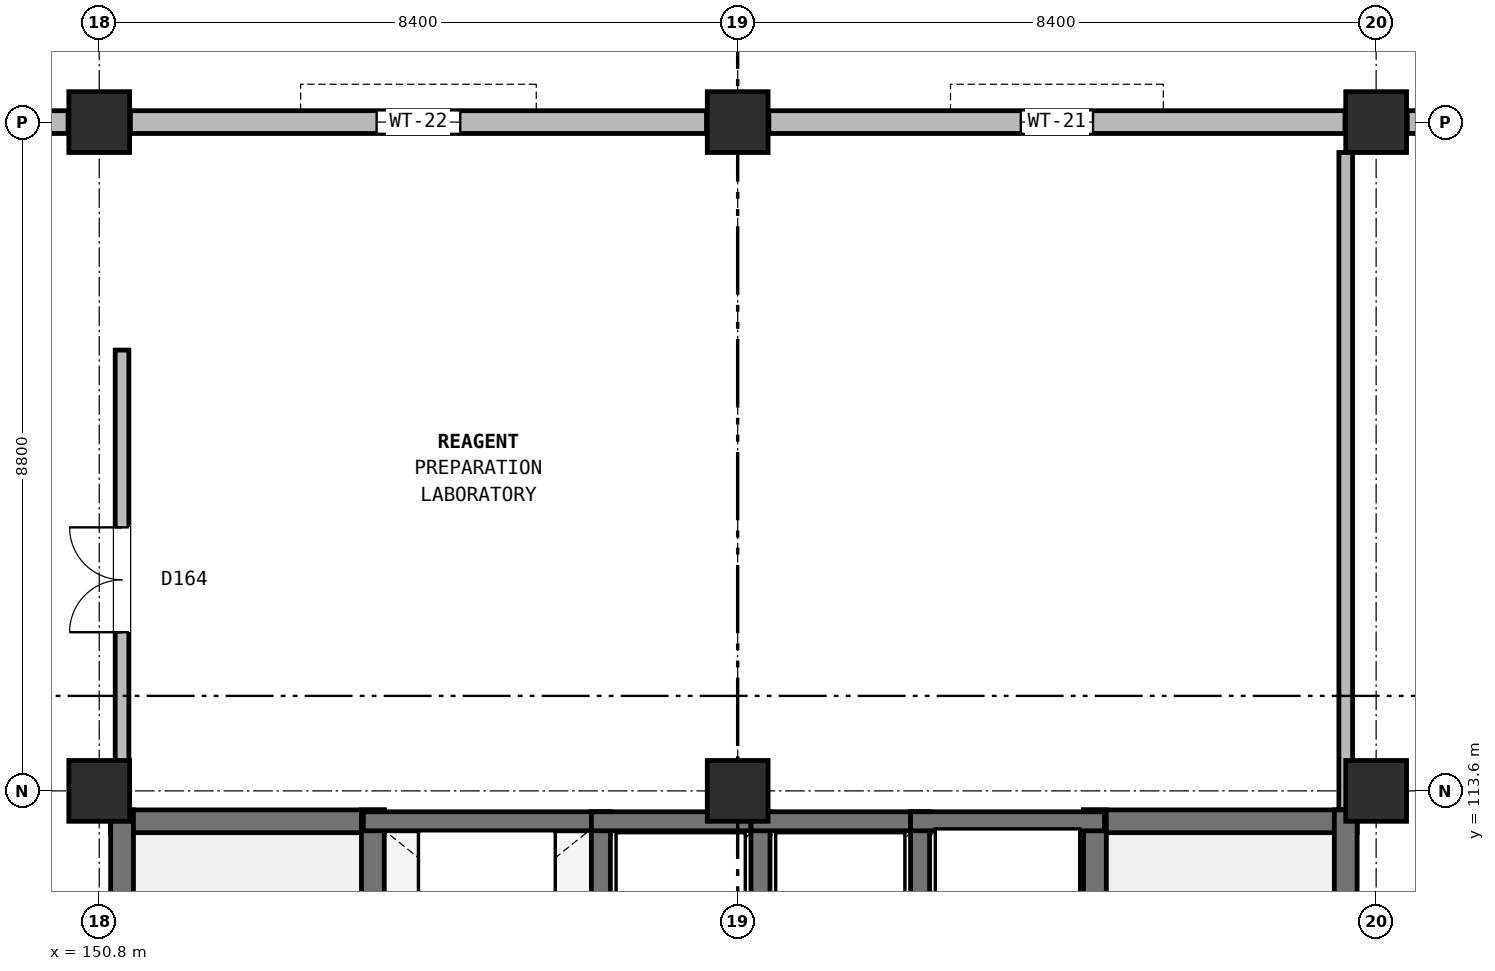
"""IFC4 building model, lengths in metres.
Left out: names, types, materials, properties, quantities, classifications, styles, units other than length and angle.
Written with IfcOpenShell. Run it as: python <this file> out.ifc"""

import sys

from ifc_helpers import new_model, si_unit, direction, frame, frame_2d, origin, origin_2d, place, context, subcontext, project, spatial, rectangle, extrude, element, fill, save


model = new_model("IFC4")
c1 = context("Model", 3, precision=1e-05, world=origin(), true_north=direction((0.0, 1.0)))
c2 = subcontext(c1, "Body", "Model", "MODEL_VIEW")
j1 = project(units=[si_unit("LENGTHUNIT", "METRE"), si_unit("PLANEANGLEUNIT", "RADIAN")], contexts=[c1])
p1 = place(None, origin())
s1 = spatial("IfcSite", under=j1, at=p1, CompositionType="ELEMENT")
p2 = place(p1, origin())
s2 = spatial("IfcBuilding", under=s1, at=p2, CompositionType="ELEMENT")
p3 = place(p2, frame((0.0, 0.0, 4.8)))
s3 = spatial("IfcBuildingStorey", under=s2, at=p3, CompositionType="ELEMENT", Elevation=4.8)
for number, where, z_axis, x_axis in (
    (1, (150.8, 113.6, 0.0), (0.0, 0.0, 1.0), (1.0, 0.0, 0.0)),
    (2, (150.8, 122.4, 0.0), (0.0, 0.0, 1.0), (1.0, 0.0, 0.0)),
    (3, (159.2, 113.6, 0.0), (0.0, 0.0, 1.0), (1.0, 0.0, 0.0)),
    (4, (159.2, 122.4, 0.0), (0.0, 0.0, 1.0), (1.0, 0.0, 0.0)),
    (5, (167.6, 113.6, 0.0), (0.0, 0.0, 1.0), (1.0, 0.0, 0.0)),
    (6, (167.6, 122.4, 0.0), (0.0, 0.0, 1.0), (1.0, 0.0, 0.0)),
):
    element("IfcColumn", number, at=place(p3, frame(where, z_axis=z_axis, x_axis=x_axis)), inside=s3, PredefinedType="COLUMN", context=c2, shape_type="SweptSolid", body=[
        extrude(rectangle(XDim=0.8, YDim=0.8, at=origin_2d()), origin(), (0.0, 0.0, 1.0), 4.2),
    ])
p4 = place(p3, frame((175.59, 122.4, 0.0), z_axis=(0.0, 0.0, 1.0), x_axis=(-1.0, 0.0, 0.0)))
e7 = element("IfcWall", 7, at=p4, inside=s3, PredefinedType="SOLIDWALL", context=c2, shape_type="SweptSolid", body=[
    extrude(rectangle(XDim=7.58, YDim=0.3, at=frame_2d((3.79, 0.0))), origin(), (0.0, 0.0, 1.0), 3.45),
])
p5 = place(p4, frame((0.395, 0.0, 0.9)))
e8 = element("IfcOpeningElement", 8, at=p5, cuts=e7, PredefinedType="OPENING", context=c2, shape_type="SweptSolid", body=[
    extrude(rectangle(XDim=3.2, YDim=2.1, at=frame_2d((1.6, 1.05))), frame((0.0, 0.16, 0.0), z_axis=(0.0, -1.0, 0.0), x_axis=(1.0, 0.0, 0.0)), (0.0, 0.0, 1.0), 0.32),
])
p6 = place(p3, frame((167.19, 122.4, 0.0), z_axis=(0.0, 0.0, 1.0), x_axis=(-1.0, 0.0, 0.0)))
e9 = element("IfcWall", 9, at=p6, inside=s3, PredefinedType="SOLIDWALL", context=c2, shape_type="SweptSolid", body=[
    extrude(rectangle(XDim=7.58, YDim=0.3, at=frame_2d((3.79, 0.0))), origin(), (0.0, 0.0, 1.0), 3.45),
])
p7 = place(p6, frame((3.315, 0.0, 0.9)))
e10 = element("IfcOpeningElement", 10, at=p7, cuts=e9, PredefinedType="OPENING", context=c2, shape_type="SweptSolid", body=[
    extrude(rectangle(XDim=0.95, YDim=1.6, at=frame_2d((0.475, 0.8))), frame((0.0, 0.16, 0.0), z_axis=(0.0, -1.0, 0.0), x_axis=(1.0, 0.0, 0.0)), (0.0, 0.0, 1.0), 0.32),
])
p8 = place(p3, frame((158.79, 122.4, 0.0), z_axis=(0.0, 0.0, 1.0), x_axis=(-1.0, 0.0, 0.0)))
e11 = element("IfcWall", 11, at=p8, inside=s3, PredefinedType="SOLIDWALL", context=c2, shape_type="SweptSolid", body=[
    extrude(rectangle(XDim=7.58, YDim=0.3, at=frame_2d((3.79, 0.0))), origin(), (0.0, 0.0, 1.0), 3.45),
])
p9 = place(p8, frame((3.24, 0.0, 0.9)))
e12 = element("IfcOpeningElement", 12, at=p9, cuts=e11, PredefinedType="OPENING", context=c2, shape_type="SweptSolid", body=[
    extrude(rectangle(XDim=1.1, YDim=1.65, at=frame_2d((0.55, 0.825))), frame((0.0, 0.16, 0.0), z_axis=(0.0, -1.0, 0.0), x_axis=(1.0, 0.0, 0.0)), (0.0, 0.0, 1.0), 0.32),
])
p10 = place(p3, frame((150.39, 122.4, 0.0), z_axis=(0.0, 0.0, 1.0), x_axis=(-1.0, 0.0, 0.0)))
e13 = element("IfcWall", 13, at=p10, inside=s3, PredefinedType="SOLIDWALL", context=c2, shape_type="SweptSolid", body=[
    extrude(rectangle(XDim=7.58, YDim=0.3, at=frame_2d((3.79, 0.0))), origin(), (0.0, 0.0, 1.0), 3.45),
])
p11 = place(p10, frame((3.15, 0.0, 0.9)))
e14 = element("IfcOpeningElement", 14, at=p11, cuts=e13, PredefinedType="OPENING", context=c2, shape_type="SweptSolid", body=[
    extrude(rectangle(XDim=1.28, YDim=1.82, at=frame_2d((0.64, 0.91))), frame((0.0, 0.16, 0.0), z_axis=(0.0, -1.0, 0.0), x_axis=(1.0, 0.0, 0.0)), (0.0, 0.0, 1.0), 0.32),
])
p12 = place(p3, frame((150.95, 113.2, 0.0), z_axis=(0.0, 0.0, 1.0), x_axis=(1.0, 0.0, 0.0)))
e15 = element("IfcWall", 15, at=p12, inside=s3, PredefinedType="SHEAR", context=c2, shape_type="SweptSolid", body=[
    extrude(rectangle(XDim=3.6, YDim=0.3, at=frame_2d((1.8, 0.0))), origin(), (0.0, 0.0, 1.0), 4.2),
])
p13 = place(p3, frame((151.1, 105.05, 0.0), z_axis=(0.0, 0.0, 1.0), x_axis=(0.0, 1.0, 0.0)))
e16 = element("IfcWall", 16, at=p13, inside=s3, PredefinedType="SHEAR", context=c2, shape_type="SweptSolid", body=[
    extrude(rectangle(XDim=8.3, YDim=0.3, at=frame_2d((4.15, 0.0))), origin(), (0.0, 0.0, 1.0), 4.2),
])
p14 = place(p3, frame((154.4, 105.05, 0.0), z_axis=(0.0, 0.0, 1.0), x_axis=(0.0, 1.0, 0.0)))
e17 = element("IfcWall", 17, at=p14, inside=s3, PredefinedType="SHEAR", context=c2, shape_type="SweptSolid", body=[
    extrude(rectangle(XDim=8.3, YDim=0.3, at=frame_2d((4.15, 0.0))), origin(), (0.0, 0.0, 1.0), 4.2),
])
p15 = place(p14, frame((0.45, 0.0, 0.0)))
e18 = element("IfcOpeningElement", 18, at=p15, cuts=e17, PredefinedType="OPENING", context=c2, shape_type="SweptSolid", body=[
    extrude(rectangle(XDim=1.1, YDim=2.2, at=frame_2d((0.55, 1.1))), frame((0.0, 0.16, 0.0), z_axis=(0.0, -1.0, 0.0), x_axis=(1.0, 0.0, 0.0)), (0.0, 0.0, 1.0), 0.32),
])
p16 = place(p3, frame((163.75, 113.2, 0.0), z_axis=(0.0, 0.0, 1.0), x_axis=(1.0, 0.0, 0.0)))
e19 = element("IfcWall", 19, at=p16, inside=s3, PredefinedType="SHEAR", context=c2, shape_type="SweptSolid", body=[
    extrude(rectangle(XDim=3.6, YDim=0.3, at=frame_2d((1.8, 0.0))), origin(), (0.0, 0.0, 1.0), 4.2),
])
for number, where, z_axis, x_axis in (
    (20, (163.9, 105.05, 0.0), (0.0, 0.0, 1.0), (0.0, 1.0, 0.0)),
    (21, (167.2, 105.05, 0.0), (0.0, 0.0, 1.0), (0.0, 1.0, 0.0)),
):
    element("IfcWall", number, at=place(p3, frame(where, z_axis=z_axis, x_axis=x_axis)), inside=s3, PredefinedType="SHEAR", context=c2, shape_type="SweptSolid", body=[
        extrude(rectangle(XDim=8.3, YDim=0.3, at=frame_2d((4.15, 0.0))), origin(), (0.0, 0.0, 1.0), 4.2),
    ])
p17 = place(p3, frame((154.275, 113.2, 0.0), z_axis=(0.0, 0.0, 1.0), x_axis=(1.0, 0.0, 0.0)))
e22 = element("IfcWall", 22, at=p17, inside=s3, PredefinedType="SOLIDWALL", context=c2, shape_type="SweptSolid", body=[
    extrude(rectangle(XDim=3.25, YDim=0.25, at=frame_2d((1.625, 0.0))), origin(), (0.0, 0.0, 1.0), 3.88),
])
p18 = place(p3, frame((157.4, 110.675, 0.0), z_axis=(0.0, 0.0, 1.0), x_axis=(0.0, 1.0, 0.0)))
e23 = element("IfcWall", 23, at=p18, inside=s3, PredefinedType="SOLIDWALL", context=c2, shape_type="SweptSolid", body=[
    extrude(rectangle(XDim=2.65, YDim=0.25, at=frame_2d((1.325, 0.0))), origin(), (0.0, 0.0, 1.0), 3.88),
])
p19 = place(p3, frame((157.275, 113.2, 0.0), z_axis=(0.0, 0.0, 1.0), x_axis=(1.0, 0.0, 0.0)))
e24 = element("IfcWall", 24, at=p19, inside=s3, PredefinedType="SOLIDWALL", context=c2, shape_type="SweptSolid", body=[
    extrude(rectangle(XDim=2.35, YDim=0.25, at=frame_2d((1.175, 0.0))), origin(), (0.0, 0.0, 1.0), 3.88),
])
p20 = place(p3, frame((159.5, 110.675, 0.0), z_axis=(0.0, 0.0, 1.0), x_axis=(0.0, 1.0, 0.0)))
e25 = element("IfcWall", 25, at=p20, inside=s3, PredefinedType="SOLIDWALL", context=c2, shape_type="SweptSolid", body=[
    extrude(rectangle(XDim=2.65, YDim=0.25, at=frame_2d((1.325, 0.0))), origin(), (0.0, 0.0, 1.0), 3.88),
])
p21 = place(p3, frame((159.375, 113.2, 0.0), z_axis=(0.0, 0.0, 1.0), x_axis=(1.0, 0.0, 0.0)))
e26 = element("IfcWall", 26, at=p21, inside=s3, PredefinedType="SOLIDWALL", context=c2, shape_type="SweptSolid", body=[
    extrude(rectangle(XDim=2.35, YDim=0.25, at=frame_2d((1.175, 0.0))), origin(), (0.0, 0.0, 1.0), 3.88),
])
p22 = place(p3, frame((161.6, 110.675, 0.0), z_axis=(0.0, 0.0, 1.0), x_axis=(0.0, 1.0, 0.0)))
e27 = element("IfcWall", 27, at=p22, inside=s3, PredefinedType="SOLIDWALL", context=c2, shape_type="SweptSolid", body=[
    extrude(rectangle(XDim=2.65, YDim=0.25, at=frame_2d((1.325, 0.0))), origin(), (0.0, 0.0, 1.0), 3.88),
])
p23 = place(p3, frame((161.475, 113.2, 0.0), z_axis=(0.0, 0.0, 1.0), x_axis=(1.0, 0.0, 0.0)))
e28 = element("IfcWall", 28, at=p23, inside=s3, PredefinedType="SOLIDWALL", context=c2, shape_type="SweptSolid", body=[
    extrude(rectangle(XDim=2.55, YDim=0.25, at=frame_2d((1.275, 0.0))), origin(), (0.0, 0.0, 1.0), 3.88),
])
p24 = place(p3, frame((151.1, 113.355, 0.0), z_axis=(0.0, 0.0, 1.0), x_axis=(0.0, 1.0, 0.0)))
e29 = element("IfcWall", 29, at=p24, inside=s3, PredefinedType="PARTITIONING", context=c2, shape_type="SweptSolid", body=[
    extrude(rectangle(XDim=6.045, YDim=0.18, at=frame_2d((3.022, 0.0))), origin(), (0.0, 0.0, 1.0), 3.445),
])
p25 = place(p24, frame((2.333, 0.0, 0.0)))
e30 = element("IfcOpeningElement", 30, at=p25, cuts=e29, PredefinedType="OPENING", context=c2, shape_type="SweptSolid", body=[
    extrude(rectangle(XDim=1.38, YDim=2.2, at=frame_2d((0.69, 1.1))), frame((0.0, 0.1, 0.0), z_axis=(0.0, -1.0, 0.0), x_axis=(1.0, 0.0, 0.0)), (0.0, 0.0, 1.0), 0.2),
])
p26 = place(p3, frame((167.2, 113.355, 0.0), z_axis=(0.0, 0.0, 1.0), x_axis=(0.0, 1.0, 0.0)))
e31 = element("IfcWall", 31, at=p26, inside=s3, PredefinedType="PARTITIONING", context=c2, shape_type="SweptSolid", body=[
    extrude(rectangle(XDim=8.645, YDim=0.18, at=frame_2d((4.323, 0.0))), origin(), (0.0, 0.0, 1.0), 3.445),
])
p27 = place(p7, origin())
e32 = element("IfcWindow", 32, at=p27, inside=s3, PartitioningType="SINGLE_PANEL", PredefinedType="WINDOW", context=c2, shape_type="SweptSolid", body=[
    extrude(rectangle(XDim=0.95, YDim=1.6, at=frame_2d((0.475, 0.8))), frame((0.0, 0.03, 0.0), z_axis=(0.0, -1.0, 0.0), x_axis=(1.0, 0.0, 0.0)), (0.0, 0.0, 1.0), 0.06),
])
fill(e10, e32)
p28 = place(p9, origin())
e33 = element("IfcWindow", 33, at=p28, inside=s3, PartitioningType="SINGLE_PANEL", PredefinedType="WINDOW", context=c2, shape_type="SweptSolid", body=[
    extrude(rectangle(XDim=1.1, YDim=1.65, at=frame_2d((0.55, 0.825))), frame((0.0, 0.03, 0.0), z_axis=(0.0, -1.0, 0.0), x_axis=(1.0, 0.0, 0.0)), (0.0, 0.0, 1.0), 0.06),
])
fill(e12, e33)
p29 = place(p25, origin())
e34 = element("IfcDoor", 34, at=p29, inside=s3, OperationType="DOUBLE_DOOR_SINGLE_SWING", PredefinedType="DOOR", context=c2, shape_type="SweptSolid", body=[
    extrude(rectangle(XDim=1.38, YDim=2.2, at=frame_2d((0.69, 1.1))), frame((0.0, 0.025, 0.0), z_axis=(0.0, -1.0, 0.0), x_axis=(1.0, 0.0, 0.0)), (0.0, 0.0, 1.0), 0.05),
])
fill(e30, e34)
save(model, sys.argv[1])
